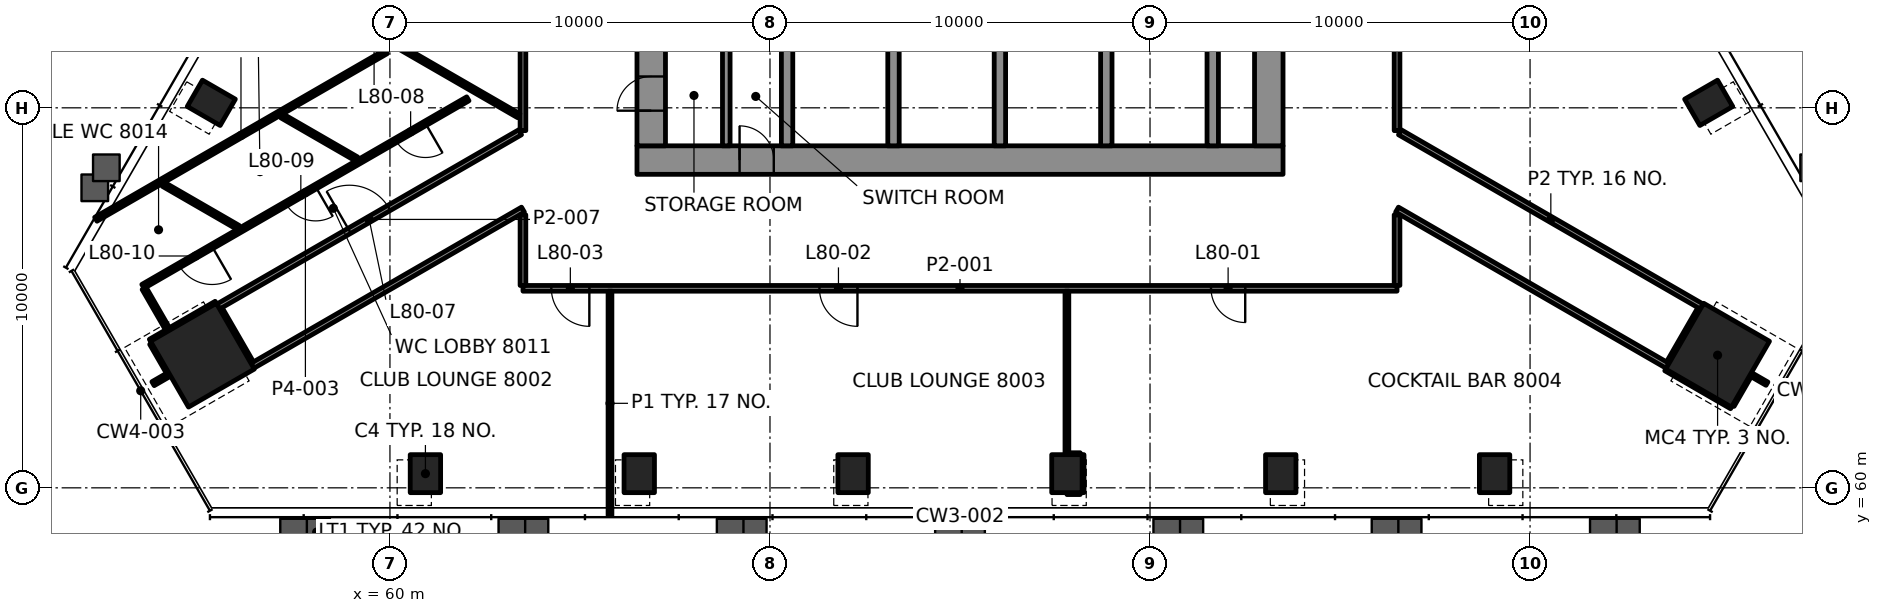
"""IFC4 building model, lengths in metres.
Left out: names, types, materials, properties, quantities, classifications, styles, units other than length and angle.
Written with IfcOpenShell. Run it as: python <this file> out.ifc"""

import sys

from ifc_helpers import new_model, si_unit, direction, frame, frame_2d, origin, origin_2d, place, context, subcontext, project, spatial, rectangle, hollow_rectangle, extrude, element, fill, save


model = new_model("IFC4")
c1 = context("Model", 3, precision=1e-05, world=origin(), true_north=direction((0.0, 1.0)))
c2 = subcontext(c1, "Body", "Model", "MODEL_VIEW")
j1 = project(units=[si_unit("LENGTHUNIT", "METRE"), si_unit("PLANEANGLEUNIT", "RADIAN")], contexts=[c1])
p1 = place(None, origin())
s1 = spatial("IfcSite", under=j1, at=p1, CompositionType="ELEMENT")
p2 = place(p1, origin())
s2 = spatial("IfcBuilding", under=s1, at=p2, CompositionType="ELEMENT")
p3 = place(p2, frame((0.0, 0.0, 326.6)))
s3 = spatial("IfcBuildingStorey", under=s2, at=p3, CompositionType="ELEMENT", Elevation=326.6)
for number, where, z_axis, x_axis in (
    (1, (94.935, 63.491, 0.0), (0.0, 0.0, 1.0), (0.5, 0.866, 0.0)),
    (2, (55.065, 63.491, 0.0), (0.0, 0.0, 1.0), (0.5, -0.866, 0.0)),
):
    element("IfcColumn", number, at=place(p3, frame(where, z_axis=z_axis, x_axis=x_axis)), inside=s3, PredefinedType="COLUMN", context=c2, shape_type="SweptSolid", body=[
        extrude(rectangle(XDim=2.0, YDim=2.0, at=origin_2d()), origin(), (0.0, 0.0, 1.0), 5.0),
    ])
for number, where, z_axis, x_axis in (
    (3, (60.933, 60.373, -0.0), (0.0, 0.0, 1.0), (1.0, 0.0, 0.0)),
    (4, (66.56, 60.373, -0.0), (0.0, 0.0, 1.0), (1.0, 0.0, 0.0)),
    (5, (72.187, 60.373, -0.0), (0.0, 0.0, 1.0), (1.0, 0.0, 0.0)),
    (6, (77.813, 60.373, -0.0), (0.0, 0.0, 1.0), (1.0, 0.0, 0.0)),
    (7, (83.44, 60.373, -0.0), (0.0, 0.0, 1.0), (1.0, 0.0, 0.0)),
    (8, (89.067, 60.373, -0.0), (0.0, 0.0, 1.0), (1.0, 0.0, 0.0)),
    (9, (94.701, 70.131, -0.0), (0.0, 0.0, 1.0), (-0.5, 0.866, 0.0)),
    (10, (55.299, 70.131, -0.0), (0.0, 0.0, 1.0), (-0.5, -0.866, 0.0)),
):
    element("IfcColumn", number, at=place(p3, frame(where, z_axis=z_axis, x_axis=x_axis)), inside=s3, PredefinedType="COLUMN", context=c2, shape_type="SweptSolid", body=[
        extrude(hollow_rectangle(XDim=0.8, YDim=1.0, WallThickness=0.05, at=origin_2d()), origin(), (0.0, 0.0, 1.0), 5.0),
    ])
p4 = place(p3, frame((66.5, 68.625, 0.0), z_axis=(0.0, 0.0, 1.0), x_axis=(1.0, 0.0, 0.0)))
e11 = element("IfcWall", 11, at=p4, inside=s3, PredefinedType="SHEAR", context=c2, shape_type="SweptSolid", body=[
    extrude(rectangle(XDim=17.0, YDim=0.75, at=frame_2d((8.5, 0.0))), origin(), (0.0, 0.0, 1.0), 4.7),
])
p5 = place(p4, frame((2.7, 0.0, 0.0)))
e12 = element("IfcOpeningElement", 12, at=p5, cuts=e11, PredefinedType="OPENING", context=c2, shape_type="SweptSolid", body=[
    extrude(rectangle(XDim=0.9, YDim=2.1, at=frame_2d((0.45, 1.05))), frame((0.0, 0.385, 0.0), z_axis=(0.0, -1.0, 0.0), x_axis=(1.0, 0.0, 0.0)), (0.0, 0.0, 1.0), 0.77),
])
p6 = place(p3, frame((66.875, 69.0, 0.0), z_axis=(0.0, 0.0, 1.0), x_axis=(0.0, 1.0, 0.0)))
e13 = element("IfcWall", 13, at=p6, inside=s3, PredefinedType="SHEAR", context=c2, shape_type="SweptSolid", body=[
    extrude(rectangle(XDim=12.0, YDim=0.75, at=frame_2d((6.0, 0.0))), origin(), (0.0, 0.0, 1.0), 4.7),
])
p7 = place(p6, frame((3.7, 0.0, 0.0)))
e14 = element("IfcOpeningElement", 14, at=p7, cuts=e13, PredefinedType="OPENING", context=c2, shape_type="SweptSolid", body=[
    extrude(rectangle(XDim=1.2, YDim=2.1, at=frame_2d((0.6, 1.05))), frame((0.0, 0.385, 0.0), z_axis=(0.0, -1.0, 0.0), x_axis=(1.0, 0.0, 0.0)), (0.0, 0.0, 1.0), 0.77),
])
p8 = place(p6, frame((0.925, 0.0, 0.0)))
e15 = element("IfcOpeningElement", 15, at=p8, cuts=e13, PredefinedType="OPENING", context=c2, shape_type="SweptSolid", body=[
    extrude(rectangle(XDim=0.9, YDim=2.1, at=frame_2d((0.45, 1.05))), frame((0.0, 0.385, 0.0), z_axis=(0.0, -1.0, 0.0), x_axis=(1.0, 0.0, 0.0)), (0.0, 0.0, 1.0), 0.77),
])
p9 = place(p3, frame((83.125, 69.0, 0.0), z_axis=(0.0, 0.0, 1.0), x_axis=(0.0, 1.0, 0.0)))
e16 = element("IfcWall", 16, at=p9, inside=s3, PredefinedType="SHEAR", context=c2, shape_type="SweptSolid", body=[
    extrude(rectangle(XDim=12.0, YDim=0.75, at=frame_2d((6.0, 0.0))), origin(), (0.0, 0.0, 1.0), 4.7),
])
p10 = place(p9, frame((3.4, 0.0, 0.0)))
e17 = element("IfcOpeningElement", 17, at=p10, cuts=e16, PredefinedType="OPENING", context=c2, shape_type="SweptSolid", body=[
    extrude(rectangle(XDim=1.8, YDim=2.1, at=frame_2d((0.9, 1.05))), frame((0.0, 0.385, 0.0), z_axis=(0.0, -1.0, 0.0), x_axis=(1.0, 0.0, 0.0)), (0.0, 0.0, 1.0), 0.77),
])
for number, where, z_axis, x_axis in (
    (18, (70.45, 69.0, 0.0), (0.0, 0.0, 1.0), (0.0, 1.0, 0.0)),
    (19, (73.25, 69.0, 0.0), (0.0, 0.0, 1.0), (0.0, 1.0, 0.0)),
    (20, (76.05, 69.0, 0.0), (0.0, 0.0, 1.0), (0.0, 1.0, 0.0)),
    (21, (78.85, 69.0, 0.0), (0.0, 0.0, 1.0), (0.0, 1.0, 0.0)),
    (22, (81.65, 69.0, 0.0), (0.0, 0.0, 1.0), (0.0, 1.0, 0.0)),
):
    element("IfcWall", number, at=place(p3, frame(where, z_axis=z_axis, x_axis=x_axis)), inside=s3, PredefinedType="SHEAR", context=c2, shape_type="SweptSolid", body=[
        extrude(rectangle(XDim=2.6, YDim=0.3, at=frame_2d((1.3, 0.0))), origin(), (0.0, 0.0, 1.0), 4.7),
    ])
p11 = place(p3, frame((77.813, 59.873, 0.0), z_axis=(0.0, 0.0, 1.0), x_axis=(1.0, 0.0, 0.0)))
e23 = element("IfcWall", 23, at=p11, inside=s3, PredefinedType="PARTITIONING", context=c2, shape_type="SweptSolid", body=[
    extrude(rectangle(XDim=0.35, YDim=0.1, at=frame_2d((0.175, 0.0))), origin(), (0.0, 0.0, 1.0), 4.1),
])
p12 = place(p3, frame((77.863, 60.873, 0.0), z_axis=(0.0, 0.0, 1.0), x_axis=(1.0, 0.0, 0.0)))
e24 = element("IfcWall", 24, at=p12, inside=s3, PredefinedType="PARTITIONING", context=c2, shape_type="SweptSolid", body=[
    extrude(rectangle(XDim=0.3, YDim=0.1, at=frame_2d((0.15, 0.0))), origin(), (0.0, 0.0, 1.0), 4.1),
])
p13 = place(p3, frame((86.5, 65.25, 0.0), z_axis=(0.0, 0.0, 1.0), x_axis=(-1.0, 0.0, 0.0)))
e25 = element("IfcWall", 25, at=p13, inside=s3, PredefinedType="PARTITIONING", context=c2, shape_type="SweptSolid", body=[
    extrude(rectangle(XDim=22.999, YDim=0.15, at=frame_2d((11.5, 0.0))), origin(), (0.0, 0.0, 1.0), 4.1),
])
p14 = place(p13, frame((3.995, 0.0, 0.0)))
e26 = element("IfcOpeningElement", 26, at=p14, cuts=e25, PredefinedType="OPENING", context=c2, shape_type="SweptSolid", body=[
    extrude(rectangle(XDim=0.9, YDim=2.1, at=frame_2d((0.45, 1.05))), frame((0.0, 0.085, 0.0), z_axis=(0.0, -1.0, 0.0), x_axis=(1.0, 0.0, 0.0)), (0.0, 0.0, 1.0), 0.17),
])
p15 = place(p13, frame((14.198, 0.0, 0.0)))
e27 = element("IfcOpeningElement", 27, at=p15, cuts=e25, PredefinedType="OPENING", context=c2, shape_type="SweptSolid", body=[
    extrude(rectangle(XDim=1.0, YDim=2.1, at=frame_2d((0.5, 1.05))), frame((0.0, 0.085, 0.0), z_axis=(0.0, -1.0, 0.0), x_axis=(1.0, 0.0, 0.0)), (0.0, 0.0, 1.0), 0.17),
])
p16 = place(p13, frame((21.253, 0.0, 0.0)))
e28 = element("IfcOpeningElement", 28, at=p16, cuts=e25, PredefinedType="OPENING", context=c2, shape_type="SweptSolid", body=[
    extrude(rectangle(XDim=1.0, YDim=2.1, at=frame_2d((0.5, 1.05))), frame((0.0, 0.085, 0.0), z_axis=(0.0, -1.0, 0.0), x_axis=(1.0, 0.0, 0.0)), (0.0, 0.0, 1.0), 0.17),
])
p17 = place(p3, frame((56.382, 63.212, 0.0), z_axis=(0.0, 0.0, 1.0), x_axis=(0.866028290602, 0.499994999852, 0.0)))
e29 = element("IfcWall", 29, at=p17, inside=s3, PredefinedType="PARTITIONING", context=c2, shape_type="SweptSolid", body=[
    extrude(rectangle(XDim=8.219, YDim=0.15, at=frame_2d((4.11, 0.0))), origin(), (0.0, 0.0, 1.0), 4.097),
])
p18 = place(p3, frame((53.766, 62.741, 0.0), z_axis=(0.0, 0.0, 1.0), x_axis=(0.866083962871, 0.499898558967, 0.0)))
e30 = element("IfcWall", 30, at=p18, inside=s3, PredefinedType="PARTITIONING", context=c2, shape_type="SweptSolid", body=[
    extrude(rectangle(XDim=0.44, YDim=0.12, at=frame_2d((0.22, 0.0))), origin(), (0.0, 0.0, 1.0), 4.1),
])
p19 = place(p3, frame((55.481, 64.77, 0.0), z_axis=(0.0, 0.0, 1.0), x_axis=(0.866028235655, 0.499995095024, 0.0)))
e31 = element("IfcWall", 31, at=p19, inside=s3, PredefinedType="PARTITIONING", context=c2, shape_type="SweptSolid", body=[
    extrude(rectangle(XDim=9.172, YDim=0.15, at=frame_2d((4.586, 0.0))), origin(), (0.0, 0.0, 1.0), 4.1),
])
p20 = place(p19, frame((3.986, 0.0, 0.0)))
e32 = element("IfcOpeningElement", 32, at=p20, cuts=e31, PredefinedType="OPENING", context=c2, shape_type="SweptSolid", body=[
    extrude(rectangle(XDim=1.2, YDim=2.1, at=frame_2d((0.6, 1.05))), frame((0.0, 0.085, 0.0), z_axis=(0.0, -1.0, 0.0), x_axis=(1.0, 0.0, 0.0)), (0.0, 0.0, 1.0), 0.17),
])
p21 = place(p3, frame((53.699, 63.857, 0.0), z_axis=(0.0, 0.0, 1.0), x_axis=(0.866010750942, 0.50002537861, 0.0)))
e33 = element("IfcWall", 33, at=p21, inside=s3, PredefinedType="PARTITIONING", context=c2, shape_type="SweptSolid", body=[
    extrude(rectangle(XDim=2.0, YDim=0.12, at=frame_2d((1.0, 0.0))), origin(), (0.0, 0.0, 1.0), 4.1),
])
p22 = place(p3, frame((62.05, 70.237, 0.0), z_axis=(0.0, 0.0, 1.0), x_axis=(-0.866021674193, -0.500006459787, 0.0)))
e34 = element("IfcWall", 34, at=p22, inside=s3, PredefinedType="PARTITIONING", context=c2, shape_type="SweptSolid", body=[
    extrude(rectangle(XDim=9.872, YDim=0.12, at=frame_2d((4.936, 0.0))), origin(), (0.0, 0.0, 1.0), 4.1),
])
p23 = place(p22, frame((1.289, 0.0, 0.0)))
e35 = element("IfcOpeningElement", 35, at=p23, cuts=e34, PredefinedType="OPENING", context=c2, shape_type="SweptSolid", body=[
    extrude(rectangle(XDim=0.9, YDim=2.1, at=frame_2d((0.45, 1.05))), frame((0.0, 0.07, 0.0), z_axis=(0.0, -1.0, 0.0), x_axis=(1.0, 0.0, 0.0)), (0.0, 0.0, 1.0), 0.14),
])
p24 = place(p22, frame((4.625, 0.0, 0.0)))
e36 = element("IfcOpeningElement", 36, at=p24, cuts=e34, PredefinedType="OPENING", context=c2, shape_type="SweptSolid", body=[
    extrude(rectangle(XDim=0.9, YDim=2.1, at=frame_2d((0.45, 1.05))), frame((0.0, 0.07, 0.0), z_axis=(0.0, -1.0, 0.0), x_axis=(1.0, 0.0, 0.0)), (0.0, 0.0, 1.0), 0.14),
])
p25 = place(p22, frame((7.772, 0.0, 0.0)))
e37 = element("IfcOpeningElement", 37, at=p25, cuts=e34, PredefinedType="OPENING", context=c2, shape_type="SweptSolid", body=[
    extrude(rectangle(XDim=1.0, YDim=2.1, at=frame_2d((0.5, 1.05))), frame((0.0, 0.07, 0.0), z_axis=(0.0, -1.0, 0.0), x_axis=(1.0, 0.0, 0.0)), (0.0, 0.0, 1.0), 0.14),
])
p26 = place(p3, frame((52.26, 67.068, 0.0), z_axis=(0.0, 0.0, 1.0), x_axis=(0.866030732089, 0.499990770993, 0.0)))
e38 = element("IfcWall", 38, at=p26, inside=s3, PredefinedType="PARTITIONING", context=c2, shape_type="SweptSolid", body=[
    extrude(rectangle(XDim=8.822, YDim=0.12, at=frame_2d((4.411, 0.0))), origin(), (0.0, 0.0, 1.0), 4.1),
])
p27 = place(p3, frame((95.325, 62.169, 0.0), z_axis=(0.0, 0.0, 1.0), x_axis=(0.50012328804, 0.865954211699, 0.0)))
e39 = element("IfcWall", 39, at=p27, inside=s3, PredefinedType="PARTITIONING", context=c2, shape_type="SweptSolid", body=[
    extrude(rectangle(XDim=0.949, YDim=0.1, at=frame_2d((0.475, 0.0))), origin(), (0.0, 0.0, 1.0), 4.1),
])
p28 = place(p3, frame((93.658, 63.281, 0.0), z_axis=(0.0, 0.0, 1.0), x_axis=(0.499988108725, 0.866032269107, 0.0)))
e40 = element("IfcWall", 40, at=p28, inside=s3, PredefinedType="PARTITIONING", context=c2, shape_type="SweptSolid", body=[
    extrude(rectangle(XDim=1.644, YDim=0.15, at=frame_2d((0.822, 0.0))), origin(), (0.0, 0.0, 1.0), 4.097),
])
p29 = place(p3, frame((86.5, 65.325, 0.0), z_axis=(0.0, 0.0, 1.0), x_axis=(0.0, 1.0, 0.0)))
e41 = element("IfcWall", 41, at=p29, inside=s3, PredefinedType="PARTITIONING", context=c2, shape_type="SweptSolid", body=[
    extrude(rectangle(XDim=1.859, YDim=0.15, at=frame_2d((0.93, 0.0))), origin(), (0.0, 0.0, 1.0), 4.097),
])
p30 = place(p3, frame((86.5, 84.425, 0.0), z_axis=(0.0, 0.0, 1.0), x_axis=(0.0, -1.0, 0.0)))
e42 = element("IfcWall", 42, at=p30, inside=s3, PredefinedType="PARTITIONING", context=c2, shape_type="SweptSolid", body=[
    extrude(rectangle(XDim=15.026, YDim=0.15, at=frame_2d((7.513, 0.0))), origin(), (0.0, 0.0, 1.0), 4.088),
])
p31 = place(p30, frame((9.978, 0.0, 0.0)))
e43 = element("IfcOpeningElement", 43, at=p31, cuts=e42, PredefinedType="OPENING", context=c2, shape_type="SweptSolid", body=[
    extrude(rectangle(XDim=0.9, YDim=2.1, at=frame_2d((0.45, 1.05))), frame((0.0, 0.085, 0.0), z_axis=(0.0, -1.0, 0.0), x_axis=(1.0, 0.0, 0.0)), (0.0, 0.0, 1.0), 0.17),
])
p32 = place(p3, frame((78.213, 59.874, 0.0), z_axis=(0.0, 0.0, 1.0), x_axis=(0.0, 1.0, 0.0)))
e44 = element("IfcWall", 44, at=p32, inside=s3, PredefinedType="PARTITIONING", context=c2, shape_type="SweptSolid", body=[
    extrude(rectangle(XDim=0.999, YDim=0.1, at=frame_2d((0.5, 0.0))), origin(), (0.0, 0.0, 1.0), 4.088),
])
p33 = place(p3, frame((77.813, 60.873, 0.0), z_axis=(0.0, 0.0, 1.0), x_axis=(0.0, 1.0, 0.0)))
e45 = element("IfcWall", 45, at=p33, inside=s3, PredefinedType="PARTITIONING", context=c2, shape_type="SweptSolid", body=[
    extrude(rectangle(XDim=4.302, YDim=0.1, at=frame_2d((2.151, 0.0))), origin(), (0.0, 0.0, 1.0), 4.1),
])
p34 = place(p3, frame((65.79, 59.273, 0.0), z_axis=(0.0, 0.0, 1.0), x_axis=(0.0, 1.0, 0.0)))
e46 = element("IfcWall", 46, at=p34, inside=s3, PredefinedType="PARTITIONING", context=c2, shape_type="SweptSolid", body=[
    extrude(rectangle(XDim=5.902, YDim=0.1, at=frame_2d((2.951, 0.0))), origin(), (0.0, 0.0, 1.0), 4.088),
])
p35 = place(p3, frame((63.5, 65.325, 0.0), z_axis=(0.0, 0.0, 1.0), x_axis=(0.0, 1.0, 0.0)))
e47 = element("IfcWall", 47, at=p35, inside=s3, PredefinedType="PARTITIONING", context=c2, shape_type="SweptSolid", body=[
    extrude(rectangle(XDim=1.859, YDim=0.15, at=frame_2d((0.93, 0.0))), origin(), (0.0, 0.0, 1.0), 4.097),
])
p36 = place(p3, frame((63.5, 69.4, 0.0), z_axis=(0.0, 0.0, 1.0), x_axis=(0.0, 1.0, 0.0)))
e48 = element("IfcWall", 48, at=p36, inside=s3, PredefinedType="PARTITIONING", context=c2, shape_type="SweptSolid", body=[
    extrude(rectangle(XDim=15.026, YDim=0.15, at=frame_2d((7.513, 0.0))), origin(), (0.0, 0.0, 1.0), 4.088),
])
p37 = place(p36, frame((5.293, 0.0, 0.0)))
e49 = element("IfcOpeningElement", 49, at=p37, cuts=e48, PredefinedType="OPENING", context=c2, shape_type="SweptSolid", body=[
    extrude(rectangle(XDim=0.9, YDim=2.1, at=frame_2d((0.45, 1.05))), frame((0.0, 0.085, 0.0), z_axis=(0.0, -1.0, 0.0), x_axis=(1.0, 0.0, 0.0)), (0.0, 0.0, 1.0), 0.17),
])
p38 = place(p3, frame((56.344, 63.277, 0.0), z_axis=(0.0, 0.0, 1.0), x_axis=(-0.500035172766, 0.866005095826, 0.0)))
e50 = element("IfcWall", 50, at=p38, inside=s3, PredefinedType="PARTITIONING", context=c2, shape_type="SweptSolid", body=[
    extrude(rectangle(XDim=1.645, YDim=0.15, at=frame_2d((0.822, 0.0))), origin(), (0.0, 0.0, 1.0), 4.097),
])
p39 = place(p3, frame((54.141, 64.193, 0.0), z_axis=(0.0, 0.0, 1.0), x_axis=(-0.499884134912, 0.866092288191, 0.0)))
e51 = element("IfcWall", 51, at=p39, inside=s3, PredefinedType="PARTITIONING", context=c2, shape_type="SweptSolid", body=[
    extrude(rectangle(XDim=1.22, YDim=0.12, at=frame_2d((0.61, 0.0))), origin(), (0.0, 0.0, 1.0), 4.1),
])
p40 = place(p3, frame((54.2, 62.991, 0.0), z_axis=(0.0, 0.0, 1.0), x_axis=(-0.499909789979, 0.8660774803, 0.0)))
e52 = element("IfcWall", 52, at=p40, inside=s3, PredefinedType="PARTITIONING", context=c2, shape_type="SweptSolid", body=[
    extrude(rectangle(XDim=0.94, YDim=0.12, at=frame_2d((0.47, 0.0))), origin(), (0.0, 0.0, 1.0), 4.1),
])
p41 = place(p3, frame((94.518, 64.771, 0.0), z_axis=(0.0, 0.0, 1.0), x_axis=(-0.866026452747, 0.499998183138, 0.0)))
e53 = element("IfcWall", 53, at=p41, inside=s3, PredefinedType="PARTITIONING", context=c2, shape_type="SweptSolid", body=[
    extrude(rectangle(XDim=9.172, YDim=0.15, at=frame_2d((4.586, 0.0))), origin(), (0.0, 0.0, 1.0), 4.1),
])
p42 = place(p3, frame((96.234, 62.741, 0.0), z_axis=(0.0, 0.0, 1.0), x_axis=(-0.866230789891, 0.499644091975, 0.0)))
e54 = element("IfcWall", 54, at=p42, inside=s3, PredefinedType="PARTITIONING", context=c2, shape_type="SweptSolid", body=[
    extrude(rectangle(XDim=0.449, YDim=0.1, at=frame_2d((0.225, 0.0))), origin(), (0.0, 0.0, 1.0), 4.1),
])
p43 = place(p3, frame((93.618, 63.211, 0.0), z_axis=(0.0, 0.0, 1.0), x_axis=(-0.866022854634, 0.500004415232, 0.0)))
e55 = element("IfcWall", 55, at=p43, inside=s3, PredefinedType="PARTITIONING", context=c2, shape_type="SweptSolid", body=[
    extrude(rectangle(XDim=8.22, YDim=0.15, at=frame_2d((4.11, 0.0))), origin(), (0.0, 0.0, 1.0), 4.097),
])
p44 = place(p3, frame((95.3, 62.125, 0.0), z_axis=(0.0, 0.0, 1.0), x_axis=(-0.866077797426, 0.499909240568, 0.0)))
e56 = element("IfcWall", 56, at=p44, inside=s3, PredefinedType="PARTITIONING", context=c2, shape_type="SweptSolid", body=[
    extrude(rectangle(XDim=1.999, YDim=0.1, at=frame_2d((1.0, 0.0))), origin(), (0.0, 0.0, 1.0), 4.1),
])
p45 = place(p3, frame((63.39, 69.791, 0.0), z_axis=(0.0, 0.0, 1.0), x_axis=(-0.866020143075, 0.500009111705, 0.0)))
e57 = element("IfcWall", 57, at=p45, inside=s3, PredefinedType="PARTITIONING", context=c2, shape_type="SweptSolid", body=[
    extrude(rectangle(XDim=4.03, YDim=0.12, at=frame_2d((2.015, 0.0))), origin(), (0.0, 0.0, 1.0), 4.1),
])
p46 = place(p3, frame((59.12, 68.655, 0.0), z_axis=(0.0, 0.0, 1.0), x_axis=(-0.866011396007, 0.500024261398, 0.0)))
e58 = element("IfcWall", 58, at=p46, inside=s3, PredefinedType="PARTITIONING", context=c2, shape_type="SweptSolid", body=[
    extrude(rectangle(XDim=2.264, YDim=0.12, at=frame_2d((1.132, 0.0))), origin(), (0.0, 0.0, 1.0), 4.1),
])
p47 = place(p3, frame((56.001, 66.854, 0.0), z_axis=(0.0, 0.0, 1.0), x_axis=(-0.866058089564, 0.499943382296, 0.0)))
e59 = element("IfcWall", 59, at=p47, inside=s3, PredefinedType="PARTITIONING", context=c2, shape_type="SweptSolid", body=[
    extrude(rectangle(XDim=2.264, YDim=0.12, at=frame_2d((1.132, 0.0))), origin(), (0.0, 0.0, 1.0), 4.1),
])
p48 = place(p3, frame((68.85, 69.0, 0.0), z_axis=(0.0, 0.0, 1.0), x_axis=(0.0, 1.0, 0.0)))
e60 = element("IfcWall", 60, at=p48, inside=s3, PredefinedType="PARTITIONING", context=c2, shape_type="SweptSolid", body=[
    extrude(rectangle(XDim=2.65, YDim=0.2, at=frame_2d((1.325, 0.0))), origin(), (0.0, 0.0, 1.0), 4.7),
])
p49 = place(p14, origin())
e61 = element("IfcDoor", 61, at=p49, inside=s3, OperationType="SINGLE_SWING_RIGHT", PredefinedType="DOOR", context=c2, shape_type="SweptSolid", body=[
    extrude(rectangle(XDim=0.9, YDim=2.1, at=frame_2d((0.45, 1.05))), frame((0.0, 0.025, 0.0), z_axis=(0.0, -1.0, 0.0), x_axis=(1.0, 0.0, 0.0)), (0.0, 0.0, 1.0), 0.05),
])
fill(e26, e61)
p50 = place(p15, origin())
e62 = element("IfcDoor", 62, at=p50, inside=s3, OperationType="SINGLE_SWING_LEFT", PredefinedType="DOOR", context=c2, shape_type="SweptSolid", body=[
    extrude(rectangle(XDim=1.0, YDim=2.1, at=frame_2d((0.5, 1.05))), frame((0.0, 0.025, 0.0), z_axis=(0.0, -1.0, 0.0), x_axis=(1.0, 0.0, 0.0)), (0.0, 0.0, 1.0), 0.05),
])
fill(e27, e62)
p51 = place(p16, origin())
e63 = element("IfcDoor", 63, at=p51, inside=s3, OperationType="SINGLE_SWING_RIGHT", PredefinedType="DOOR", context=c2, shape_type="SweptSolid", body=[
    extrude(rectangle(XDim=1.0, YDim=2.1, at=frame_2d((0.5, 1.05))), frame((0.0, 0.025, 0.0), z_axis=(0.0, -1.0, 0.0), x_axis=(1.0, 0.0, 0.0)), (0.0, 0.0, 1.0), 0.05),
])
fill(e28, e63)
p52 = place(p20, origin())
e64 = element("IfcDoor", 64, at=p52, inside=s3, OperationType="DOUBLE_DOOR_SINGLE_SWING", PredefinedType="DOOR", context=c2, shape_type="SweptSolid", body=[
    extrude(rectangle(XDim=1.2, YDim=2.1, at=frame_2d((0.6, 1.05))), frame((0.0, 0.025, 0.0), z_axis=(0.0, -1.0, 0.0), x_axis=(1.0, 0.0, 0.0)), (0.0, 0.0, 1.0), 0.05),
])
fill(e32, e64)
p53 = place(p23, origin())
e65 = element("IfcDoor", 65, at=p53, inside=s3, OperationType="SINGLE_SWING_RIGHT", PredefinedType="DOOR", context=c2, shape_type="SweptSolid", body=[
    extrude(rectangle(XDim=0.9, YDim=2.1, at=frame_2d((0.45, 1.05))), frame((0.0, 0.025, 0.0), z_axis=(0.0, -1.0, 0.0), x_axis=(1.0, 0.0, 0.0)), (0.0, 0.0, 1.0), 0.05),
])
fill(e35, e65)
p54 = place(p24, origin())
e66 = element("IfcDoor", 66, at=p54, inside=s3, OperationType="SINGLE_SWING_LEFT", PredefinedType="DOOR", context=c2, shape_type="SweptSolid", body=[
    extrude(rectangle(XDim=0.9, YDim=2.1, at=frame_2d((0.45, 1.05))), frame((0.0, 0.025, 0.0), z_axis=(0.0, -1.0, 0.0), x_axis=(1.0, 0.0, 0.0)), (0.0, 0.0, 1.0), 0.05),
])
fill(e36, e66)
p55 = place(p25, origin())
e67 = element("IfcDoor", 67, at=p55, inside=s3, OperationType="SINGLE_SWING_RIGHT", PredefinedType="DOOR", context=c2, shape_type="SweptSolid", body=[
    extrude(rectangle(XDim=1.0, YDim=2.1, at=frame_2d((0.5, 1.05))), frame((0.0, 0.025, 0.0), z_axis=(0.0, -1.0, 0.0), x_axis=(1.0, 0.0, 0.0)), (0.0, 0.0, 1.0), 0.05),
])
fill(e37, e67)
p56 = place(p8, origin())
e68 = element("IfcDoor", 68, at=p56, inside=s3, OperationType="SINGLE_SWING_RIGHT", PredefinedType="DOOR", context=c2, shape_type="SweptSolid", body=[
    extrude(rectangle(XDim=0.9, YDim=2.1, at=frame_2d((0.45, 1.05))), frame((0.0, 0.095, 0.0), z_axis=(0.0, -1.0, 0.0), x_axis=(1.0, 0.0, 0.0)), (0.0, 0.0, 1.0), 0.19),
])
fill(e15, e68)
p57 = place(p5, origin())
e69 = element("IfcDoor", 69, at=p57, inside=s3, OperationType="SINGLE_SWING_LEFT", PredefinedType="DOOR", context=c2, shape_type="SweptSolid", body=[
    extrude(rectangle(XDim=0.9, YDim=2.1, at=frame_2d((0.45, 1.05))), frame((0.0, 0.095, 0.0), z_axis=(0.0, -1.0, 0.0), x_axis=(1.0, 0.0, 0.0)), (0.0, 0.0, 1.0), 0.19),
])
fill(e12, e69)
save(model, sys.argv[1])
